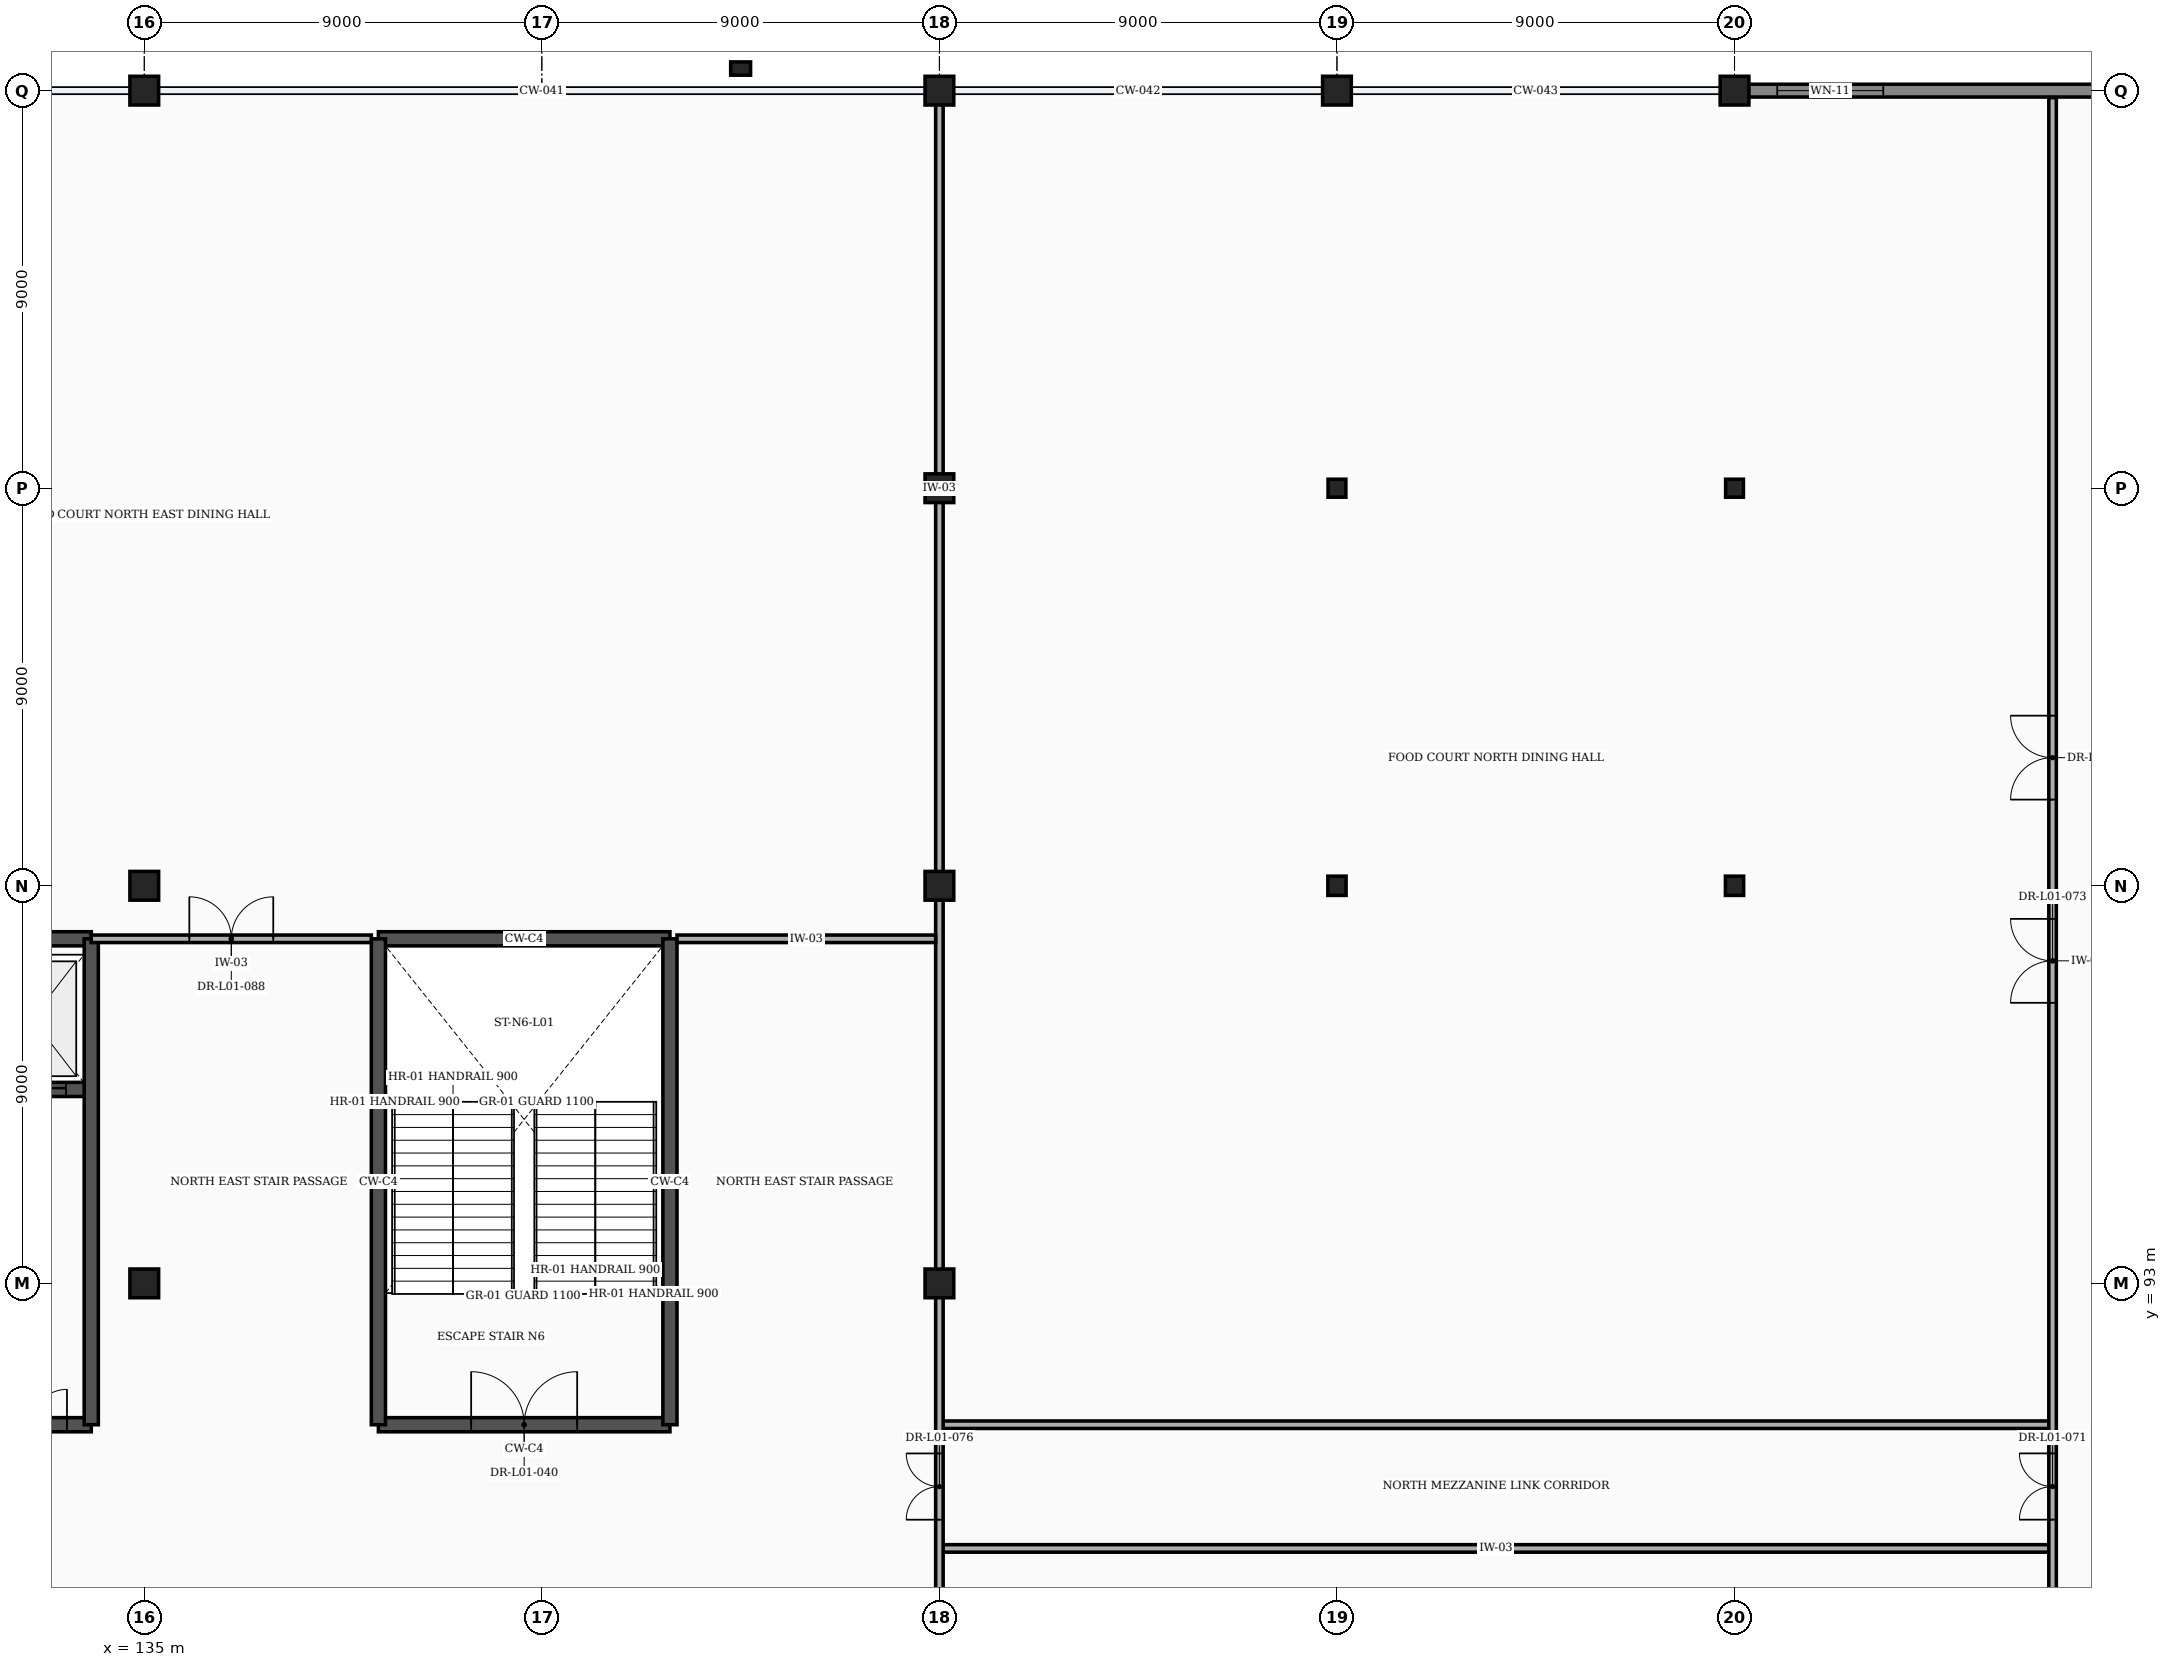
"""IFC4 building model, lengths in metres.
Left out: names, types, materials, properties, quantities, classifications, styles, units other than length and angle.
Written with IfcOpenShell. Run it as: python <this file> out.ifc"""

import sys

from ifc_helpers import new_model, si_unit, direction, frame, frame_2d, origin, origin_2d, place, context, subcontext, project, spatial, rectangle, i_section, extrude, element, fill, save


model = new_model("IFC4")
c1 = context("Model", 3, precision=1e-05, world=origin(), true_north=direction((0.0, 1.0)))
c2 = subcontext(c1, "Body", "Model", "MODEL_VIEW")
j1 = project(units=[si_unit("LENGTHUNIT", "METRE"), si_unit("PLANEANGLEUNIT", "RADIAN")], contexts=[c1])
p1 = place(None, origin())
s1 = spatial("IfcSite", under=j1, at=p1, CompositionType="ELEMENT")
p2 = place(p1, origin())
s2 = spatial("IfcBuilding", under=s1, at=p2, CompositionType="ELEMENT")
p3 = place(p2, frame((0.0, 0.0, 6.0)))
s3 = spatial("IfcBuildingStorey", under=s2, at=p3, CompositionType="ELEMENT", Elevation=6.0)
for number, where, z_axis, x_axis in (
    (1, (135.0, 93.0, 0.0), (0.0, 0.0, 1.0), (1.0, 0.0, 0.0)),
    (2, (135.0, 102.0, 0.0), (0.0, 0.0, 1.0), (1.0, 0.0, 0.0)),
    (3, (135.0, 120.0, 0.0), (0.0, 0.0, 1.0), (1.0, 0.0, 0.0)),
    (4, (153.0, 93.0, 0.0), (0.0, 0.0, 1.0), (1.0, 0.0, 0.0)),
    (5, (153.0, 102.0, 0.0), (0.0, 0.0, 1.0), (1.0, 0.0, 0.0)),
    (6, (153.0, 111.0, 0.0), (0.0, 0.0, 1.0), (1.0, 0.0, 0.0)),
    (7, (153.0, 120.0, 0.0), (0.0, 0.0, 1.0), (1.0, 0.0, 0.0)),
):
    element("IfcColumn", number, at=place(p3, frame(where, z_axis=z_axis, x_axis=x_axis)), inside=s3, PredefinedType="COLUMN", context=c2, shape_type="SweptSolid", body=[
        extrude(rectangle(XDim=0.65, YDim=0.65, at=origin_2d()), origin(), (0.0, 0.0, 1.0), 5.4),
    ])
p4 = place(p3, frame((162.0, 102.0, 0.0), z_axis=(0.0, 0.0, 1.0), x_axis=(1.0, 0.0, 0.0)))
e8 = element("IfcColumn", 8, at=p4, inside=s3, PredefinedType="COLUMN", context=c2, shape_type="SweptSolid", body=[
    extrude(i_section(OverallWidth=0.412, OverallDepth=0.435, WebThickness=0.036, FlangeThickness=0.058, at=origin_2d()), origin(), (0.0, 0.0, 1.0), 5.4),
])
p5 = place(p3, frame((162.0, 111.0, 0.0), z_axis=(0.0, 0.0, 1.0), x_axis=(1.0, 0.0, 0.0)))
e9 = element("IfcColumn", 9, at=p5, inside=s3, PredefinedType="COLUMN", context=c2, shape_type="SweptSolid", body=[
    extrude(i_section(OverallWidth=0.403, OverallDepth=0.406, WebThickness=0.027, FlangeThickness=0.043, at=origin_2d()), origin(), (0.0, 0.0, 1.0), 5.4),
])
p6 = place(p3, frame((162.0, 120.0, 0.0), z_axis=(0.0, 0.0, 1.0), x_axis=(1.0, 0.0, 0.0)))
e10 = element("IfcColumn", 10, at=p6, inside=s3, PredefinedType="COLUMN", context=c2, shape_type="SweptSolid", body=[
    extrude(rectangle(XDim=0.65, YDim=0.65, at=origin_2d()), origin(), (0.0, 0.0, 1.0), 5.4),
])
p7 = place(p3, frame((171.0, 102.0, 0.0), z_axis=(0.0, 0.0, 1.0), x_axis=(1.0, 0.0, 0.0)))
e11 = element("IfcColumn", 11, at=p7, inside=s3, PredefinedType="COLUMN", context=c2, shape_type="SweptSolid", body=[
    extrude(i_section(OverallWidth=0.412, OverallDepth=0.435, WebThickness=0.036, FlangeThickness=0.058, at=origin_2d()), origin(), (0.0, 0.0, 1.0), 5.4),
])
p8 = place(p3, frame((171.0, 111.0, 0.0), z_axis=(0.0, 0.0, 1.0), x_axis=(1.0, 0.0, 0.0)))
e12 = element("IfcColumn", 12, at=p8, inside=s3, PredefinedType="COLUMN", context=c2, shape_type="SweptSolid", body=[
    extrude(i_section(OverallWidth=0.403, OverallDepth=0.406, WebThickness=0.027, FlangeThickness=0.043, at=origin_2d()), origin(), (0.0, 0.0, 1.0), 5.4),
])
p9 = place(p3, frame((171.0, 120.0, 0.0), z_axis=(0.0, 0.0, 1.0), x_axis=(1.0, 0.0, 0.0)))
e13 = element("IfcColumn", 13, at=p9, inside=s3, PredefinedType="COLUMN", context=c2, shape_type="SweptSolid", body=[
    extrude(rectangle(XDim=0.65, YDim=0.65, at=origin_2d()), origin(), (0.0, 0.0, 1.0), 5.4),
])
p10 = place(p3, frame((148.5, 120.5, 0.0), z_axis=(0.0, 0.0, 1.0), x_axis=(1.0, 0.0, 0.0)))
e14 = element("IfcColumn", 14, at=p10, inside=s3, PredefinedType="PILASTER", context=c2, shape_type="SweptSolid", body=[
    extrude(rectangle(XDim=0.45, YDim=0.3, at=origin_2d()), origin(), (0.0, 0.0, 1.0), 5.4),
])
p11 = place(p3, frame((171.317, 120.0, 0.0), z_axis=(0.0, 0.0, 1.0), x_axis=(1.0, 0.0, 0.0)))
e15 = element("IfcWall", 15, at=p11, inside=s3, PredefinedType="STANDARD", context=c2, shape_type="SweptSolid", body=[
    extrude(rectangle(XDim=17.366, YDim=0.29, at=frame_2d((8.683, 0.0))), origin(), (0.0, 0.0, 1.0), 4.388),
])
p12 = place(p11, frame((0.65, 0.0, 0.85)))
e16 = element("IfcOpeningElement", 16, at=p12, cuts=e15, PredefinedType="OPENING", context=c2, shape_type="SweptSolid", body=[
    extrude(rectangle(XDim=2.4, YDim=2.6, at=frame_2d((1.2, 1.3))), frame((0.0, 0.157, 0.0), z_axis=(0.0, -1.0, 0.0), x_axis=(1.0, 0.0, 0.0)), (0.0, 0.0, 1.0), 0.314),
])
p13 = place(p3, frame((127.2, 89.8, 0.0), z_axis=(0.0, 0.0, 1.0), x_axis=(1.0, 0.0, 0.0)))
e17 = element("IfcWall", 17, at=p13, inside=s3, PredefinedType="SHEAR", context=c2, shape_type="SweptSolid", body=[
    extrude(rectangle(XDim=6.6, YDim=0.32, at=frame_2d((3.3, 0.0))), origin(), (0.0, 0.0, 1.0), 5.15),
])
p14 = place(p13, frame((4.45, 0.0, 0.0)))
e18 = element("IfcOpeningElement", 18, at=p14, cuts=e17, PredefinedType="OPENING", context=c2, shape_type="SweptSolid", body=[
    extrude(rectangle(XDim=1.6, YDim=2.3, at=frame_2d((0.8, 1.15))), frame((0.0, 0.172, 0.0), z_axis=(0.0, -1.0, 0.0), x_axis=(1.0, 0.0, 0.0)), (0.0, 0.0, 1.0), 0.344),
])
p15 = place(p3, frame((127.2, 100.8, 0.0), z_axis=(0.0, 0.0, 1.0), x_axis=(1.0, 0.0, 0.0)))
e19 = element("IfcWall", 19, at=p15, inside=s3, PredefinedType="SHEAR", context=c2, shape_type="SweptSolid", body=[
    extrude(rectangle(XDim=6.6, YDim=0.32, at=frame_2d((3.3, 0.0))), origin(), (0.0, 0.0, 1.0), 5.15),
])
p16 = place(p3, frame((133.8, 89.8, 0.0), z_axis=(0.0, 0.0, 1.0), x_axis=(0.0, 1.0, 0.0)))
e20 = element("IfcWall", 20, at=p16, inside=s3, PredefinedType="SHEAR", context=c2, shape_type="SweptSolid", body=[
    extrude(rectangle(XDim=11.0, YDim=0.32, at=frame_2d((5.5, 0.0))), origin(), (0.0, 0.0, 1.0), 5.15),
])
p17 = place(p3, frame((131.28, 97.39, 0.0), z_axis=(0.0, 0.0, 1.0), x_axis=(1.0, 0.0, 0.0)))
e21 = element("IfcWall", 21, at=p17, inside=s3, PredefinedType="SHEAR", context=c2, shape_type="SweptSolid", body=[
    extrude(rectangle(XDim=2.36, YDim=0.32, at=frame_2d((1.18, 0.0))), origin(), (0.0, 0.0, 1.0), 5.15),
])
p18 = place(p17, frame((0.3, 0.0, 0.0)))
e22 = element("IfcOpeningElement", 22, at=p18, cuts=e21, PredefinedType="OPENING", context=c2, shape_type="SweptSolid", body=[
    extrude(rectangle(XDim=1.65, YDim=2.35, at=frame_2d((0.825, 1.175))), frame((0.0, 0.172, 0.0), z_axis=(0.0, -1.0, 0.0), x_axis=(1.0, 0.0, 0.0)), (0.0, 0.0, 1.0), 0.344),
])
p19 = place(p3, frame((140.3, 89.8, 0.0), z_axis=(0.0, 0.0, 1.0), x_axis=(1.0, 0.0, 0.0)))
e23 = element("IfcWall", 23, at=p19, inside=s3, PredefinedType="SHEAR", context=c2, shape_type="SweptSolid", body=[
    extrude(rectangle(XDim=6.6, YDim=0.32, at=frame_2d((3.3, 0.0))), origin(), (0.0, 0.0, 1.0), 5.15),
])
p20 = place(p19, frame((2.1, 0.0, 0.0)))
e24 = element("IfcOpeningElement", 24, at=p20, cuts=e23, PredefinedType="OPENING", context=c2, shape_type="SweptSolid", body=[
    extrude(rectangle(XDim=2.4, YDim=2.25, at=frame_2d((1.2, 1.125))), frame((0.0, 0.172, 0.0), z_axis=(0.0, -1.0, 0.0), x_axis=(1.0, 0.0, 0.0)), (0.0, 0.0, 1.0), 0.344),
])
p21 = place(p3, frame((140.3, 100.8, 0.0), z_axis=(0.0, 0.0, 1.0), x_axis=(1.0, 0.0, 0.0)))
e25 = element("IfcWall", 25, at=p21, inside=s3, PredefinedType="SHEAR", context=c2, shape_type="SweptSolid", body=[
    extrude(rectangle(XDim=6.6, YDim=0.32, at=frame_2d((3.3, 0.0))), origin(), (0.0, 0.0, 1.0), 5.15),
])
for number, where, z_axis, x_axis in (
    (26, (140.3, 89.8, 0.0), (0.0, 0.0, 1.0), (0.0, 1.0, 0.0)),
    (27, (146.9, 89.8, 0.0), (0.0, 0.0, 1.0), (0.0, 1.0, 0.0)),
):
    element("IfcWall", number, at=place(p3, frame(where, z_axis=z_axis, x_axis=x_axis)), inside=s3, PredefinedType="SHEAR", context=c2, shape_type="SweptSolid", body=[
        extrude(rectangle(XDim=11.0, YDim=0.32, at=frame_2d((5.5, 0.0))), origin(), (0.0, 0.0, 1.0), 5.15),
    ])
for number, where, z_axis, x_axis in (
    (28, (153.085, 87.0, 0.0), (0.0, 0.0, 1.0), (1.0, 0.0, 0.0)),
    (29, (153.085, 89.8, 0.0), (0.0, 0.0, 1.0), (1.0, 0.0, 0.0)),
):
    element("IfcWall", number, at=place(p3, frame(where, z_axis=z_axis, x_axis=x_axis)), inside=s3, PredefinedType="PARTITIONING", context=c2, shape_type="SweptSolid", body=[
        extrude(rectangle(XDim=25.03, YDim=0.17, at=frame_2d((12.515, 0.0))), origin(), (0.0, 0.0, 1.0), 5.15),
    ])
p22 = place(p3, frame((178.2, 80.76, 0.0), z_axis=(0.0, 0.0, 1.0), x_axis=(0.0, 1.0, 0.0)))
e30 = element("IfcWall", 30, at=p22, inside=s3, PredefinedType="PARTITIONING", context=c2, shape_type="SweptSolid", body=[
    extrude(rectangle(XDim=39.083, YDim=0.17, at=frame_2d((19.541, 0.0))), origin(), (0.0, 0.0, 1.0), 5.15),
])
p23 = place(p22, frame((6.891, 0.0, 0.0)))
e31 = element("IfcOpeningElement", 31, at=p23, cuts=e30, PredefinedType="OPENING", context=c2, shape_type="SweptSolid", body=[
    extrude(rectangle(XDim=1.5, YDim=2.2, at=frame_2d((0.75, 1.1))), frame((0.0, 0.097, 0.0), z_axis=(0.0, -1.0, 0.0), x_axis=(1.0, 0.0, 0.0)), (0.0, 0.0, 1.0), 0.194),
])
p24 = place(p22, frame((23.191, 0.0, 0.0)))
e32 = element("IfcOpeningElement", 32, at=p24, cuts=e30, PredefinedType="OPENING", context=c2, shape_type="SweptSolid", body=[
    extrude(rectangle(XDim=1.9, YDim=2.35, at=frame_2d((0.95, 1.175))), frame((0.0, 0.097, 0.0), z_axis=(0.0, -1.0, 0.0), x_axis=(1.0, 0.0, 0.0)), (0.0, 0.0, 1.0), 0.194),
])
p25 = place(p22, frame((18.591, 0.0, 0.0)))
e33 = element("IfcOpeningElement", 33, at=p25, cuts=e30, PredefinedType="OPENING", context=c2, shape_type="SweptSolid", body=[
    extrude(rectangle(XDim=1.9, YDim=2.35, at=frame_2d((0.95, 1.175))), frame((0.0, 0.097, 0.0), z_axis=(0.0, -1.0, 0.0), x_axis=(1.0, 0.0, 0.0)), (0.0, 0.0, 1.0), 0.194),
])
p26 = place(p22, frame((0.3, 0.0, 0.0)))
e34 = element("IfcOpeningElement", 34, at=p26, cuts=e30, PredefinedType="OPENING", context=c2, shape_type="SweptSolid", body=[
    extrude(rectangle(XDim=1.9, YDim=2.35, at=frame_2d((0.95, 1.175))), frame((0.0, 0.097, 0.0), z_axis=(0.0, -1.0, 0.0), x_axis=(1.0, 0.0, 0.0)), (0.0, 0.0, 1.0), 0.194),
])
p27 = place(p3, frame((153.0, 84.22, 0.0), z_axis=(0.0, 0.0, 1.0), x_axis=(0.0, 1.0, 0.0)))
e35 = element("IfcWall", 35, at=p27, inside=s3, PredefinedType="PARTITIONING", context=c2, shape_type="SweptSolid", body=[
    extrude(rectangle(XDim=8.56, YDim=0.17, at=frame_2d((4.28, 0.0))), origin(), (0.0, 0.0, 1.0), 4.617),
])
p28 = place(p27, frame((3.43, 0.0, 0.0)))
e36 = element("IfcOpeningElement", 36, at=p28, cuts=e35, PredefinedType="OPENING", context=c2, shape_type="SweptSolid", body=[
    extrude(rectangle(XDim=1.5, YDim=2.2, at=frame_2d((0.75, 1.1))), frame((0.0, 0.097, 0.0), z_axis=(0.0, -1.0, 0.0), x_axis=(1.0, 0.0, 0.0)), (0.0, 0.0, 1.0), 0.194),
])
p29 = place(p3, frame((153.0, 93.22, 0.0), z_axis=(0.0, 0.0, 1.0), x_axis=(0.0, 1.0, 0.0)))
e37 = element("IfcWall", 37, at=p29, inside=s3, PredefinedType="PARTITIONING", context=c2, shape_type="SweptSolid", body=[
    extrude(rectangle(XDim=8.56, YDim=0.17, at=frame_2d((4.28, 0.0))), origin(), (0.0, 0.0, 1.0), 4.617),
])
p30 = place(p3, frame((153.0, 102.22, 0.0), z_axis=(0.0, 0.0, 1.0), x_axis=(0.0, 1.0, 0.0)))
e38 = element("IfcWall", 38, at=p30, inside=s3, PredefinedType="PARTITIONING", context=c2, shape_type="SweptSolid", body=[
    extrude(rectangle(XDim=17.56, YDim=0.17, at=frame_2d((8.78, 0.0))), origin(), (0.0, 0.0, 1.0), 4.617),
])
p31 = place(p3, frame((133.8, 100.8, 0.0), z_axis=(0.0, 0.0, 1.0), x_axis=(1.0, 0.0, 0.0)))
e39 = element("IfcWall", 39, at=p31, inside=s3, PredefinedType="PARTITIONING", context=c2, shape_type="SweptSolid", body=[
    extrude(rectangle(XDim=6.34, YDim=0.17, at=frame_2d((3.17, 0.0))), origin(), (0.0, 0.0, 1.0), 5.15),
])
p32 = place(p31, frame((2.22, 0.0, 0.0)))
e40 = element("IfcOpeningElement", 40, at=p32, cuts=e39, PredefinedType="OPENING", context=c2, shape_type="SweptSolid", body=[
    extrude(rectangle(XDim=1.9, YDim=2.35, at=frame_2d((0.95, 1.175))), frame((0.0, 0.097, 0.0), z_axis=(0.0, -1.0, 0.0), x_axis=(1.0, 0.0, 0.0)), (0.0, 0.0, 1.0), 0.194),
])
p33 = place(p3, frame((147.06, 100.8, 0.0), z_axis=(0.0, 0.0, 1.0), x_axis=(1.0, 0.0, 0.0)))
e41 = element("IfcWall", 41, at=p33, inside=s3, PredefinedType="PARTITIONING", context=c2, shape_type="SweptSolid", body=[
    extrude(rectangle(XDim=5.855, YDim=0.17, at=frame_2d((2.927, 0.0))), origin(), (0.0, 0.0, 1.0), 5.15),
])
p34 = place(p12, origin())
e42 = element("IfcWindow", 42, at=p34, inside=s3, PartitioningType="SINGLE_PANEL", PredefinedType="WINDOW", context=c2, shape_type="SweptSolid", body=[
    extrude(rectangle(XDim=2.4, YDim=2.6, at=frame_2d((1.2, 1.3))), frame((0.0, 0.03, 0.0), z_axis=(0.0, -1.0, 0.0), x_axis=(1.0, 0.0, 0.0)), (0.0, 0.0, 1.0), 0.06),
])
fill(e16, e42)
p35 = place(p18, origin())
e43 = element("IfcDoor", 43, at=p35, inside=s3, OperationType="DOUBLE_DOOR_SLIDING", PredefinedType="DOOR", context=c2, shape_type="SweptSolid", body=[
    extrude(rectangle(XDim=1.65, YDim=2.35, at=frame_2d((0.825, 1.175))), frame((0.0, 0.025, 0.0), z_axis=(0.0, -1.0, 0.0), x_axis=(1.0, 0.0, 0.0)), (0.0, 0.0, 1.0), 0.05),
])
fill(e22, e43)
p36 = place(p14, origin())
e44 = element("IfcDoor", 44, at=p36, inside=s3, OperationType="DOUBLE_DOOR_SINGLE_SWING", PredefinedType="DOOR", context=c2, shape_type="SweptSolid", body=[
    extrude(rectangle(XDim=1.6, YDim=2.3, at=frame_2d((0.8, 1.15))), frame((0.0, 0.025, 0.0), z_axis=(0.0, -1.0, 0.0), x_axis=(1.0, 0.0, 0.0)), (0.0, 0.0, 1.0), 0.05),
])
fill(e18, e44)
p37 = place(p20, origin())
e45 = element("IfcDoor", 45, at=p37, inside=s3, OperationType="DOUBLE_DOOR_SINGLE_SWING", PredefinedType="DOOR", context=c2, shape_type="SweptSolid", body=[
    extrude(rectangle(XDim=2.4, YDim=2.25, at=frame_2d((1.2, 1.125))), frame((0.0, 0.025, 0.0), z_axis=(0.0, -1.0, 0.0), x_axis=(1.0, 0.0, 0.0)), (0.0, 0.0, 1.0), 0.05),
])
fill(e24, e45)
p38 = place(p23, origin())
e46 = element("IfcDoor", 46, at=p38, inside=s3, OperationType="DOUBLE_DOOR_SINGLE_SWING", PredefinedType="DOOR", context=c2, shape_type="SweptSolid", body=[
    extrude(rectangle(XDim=1.5, YDim=2.2, at=frame_2d((0.75, 1.1))), frame((0.0, 0.025, 0.0), z_axis=(0.0, -1.0, 0.0), x_axis=(1.0, 0.0, 0.0)), (0.0, 0.0, 1.0), 0.05),
])
fill(e31, e46)
p39 = place(p24, origin())
e47 = element("IfcDoor", 47, at=p39, inside=s3, OperationType="DOUBLE_DOOR_SINGLE_SWING", PredefinedType="DOOR", context=c2, shape_type="SweptSolid", body=[
    extrude(rectangle(XDim=1.9, YDim=2.35, at=frame_2d((0.95, 1.175))), frame((0.0, 0.025, 0.0), z_axis=(0.0, -1.0, 0.0), x_axis=(1.0, 0.0, 0.0)), (0.0, 0.0, 1.0), 0.05),
])
fill(e32, e47)
p40 = place(p25, origin())
e48 = element("IfcDoor", 48, at=p40, inside=s3, OperationType="DOUBLE_DOOR_SINGLE_SWING", PredefinedType="DOOR", context=c2, shape_type="SweptSolid", body=[
    extrude(rectangle(XDim=1.9, YDim=2.35, at=frame_2d((0.95, 1.175))), frame((0.0, 0.025, 0.0), z_axis=(0.0, -1.0, 0.0), x_axis=(1.0, 0.0, 0.0)), (0.0, 0.0, 1.0), 0.05),
])
fill(e33, e48)
p41 = place(p28, origin())
e49 = element("IfcDoor", 49, at=p41, inside=s3, OperationType="DOUBLE_DOOR_SINGLE_SWING", PredefinedType="DOOR", context=c2, shape_type="SweptSolid", body=[
    extrude(rectangle(XDim=1.5, YDim=2.2, at=frame_2d((0.75, 1.1))), frame((0.0, 0.025, 0.0), z_axis=(0.0, -1.0, 0.0), x_axis=(1.0, 0.0, 0.0)), (0.0, 0.0, 1.0), 0.05),
])
fill(e36, e49)
p42 = place(p32, origin())
e50 = element("IfcDoor", 50, at=p42, inside=s3, OperationType="DOUBLE_DOOR_SINGLE_SWING", PredefinedType="DOOR", context=c2, shape_type="SweptSolid", body=[
    extrude(rectangle(XDim=1.9, YDim=2.35, at=frame_2d((0.95, 1.175))), frame((0.0, 0.025, 0.0), z_axis=(0.0, -1.0, 0.0), x_axis=(1.0, 0.0, 0.0)), (0.0, 0.0, 1.0), 0.05),
])
fill(e40, e50)
save(model, sys.argv[1])
